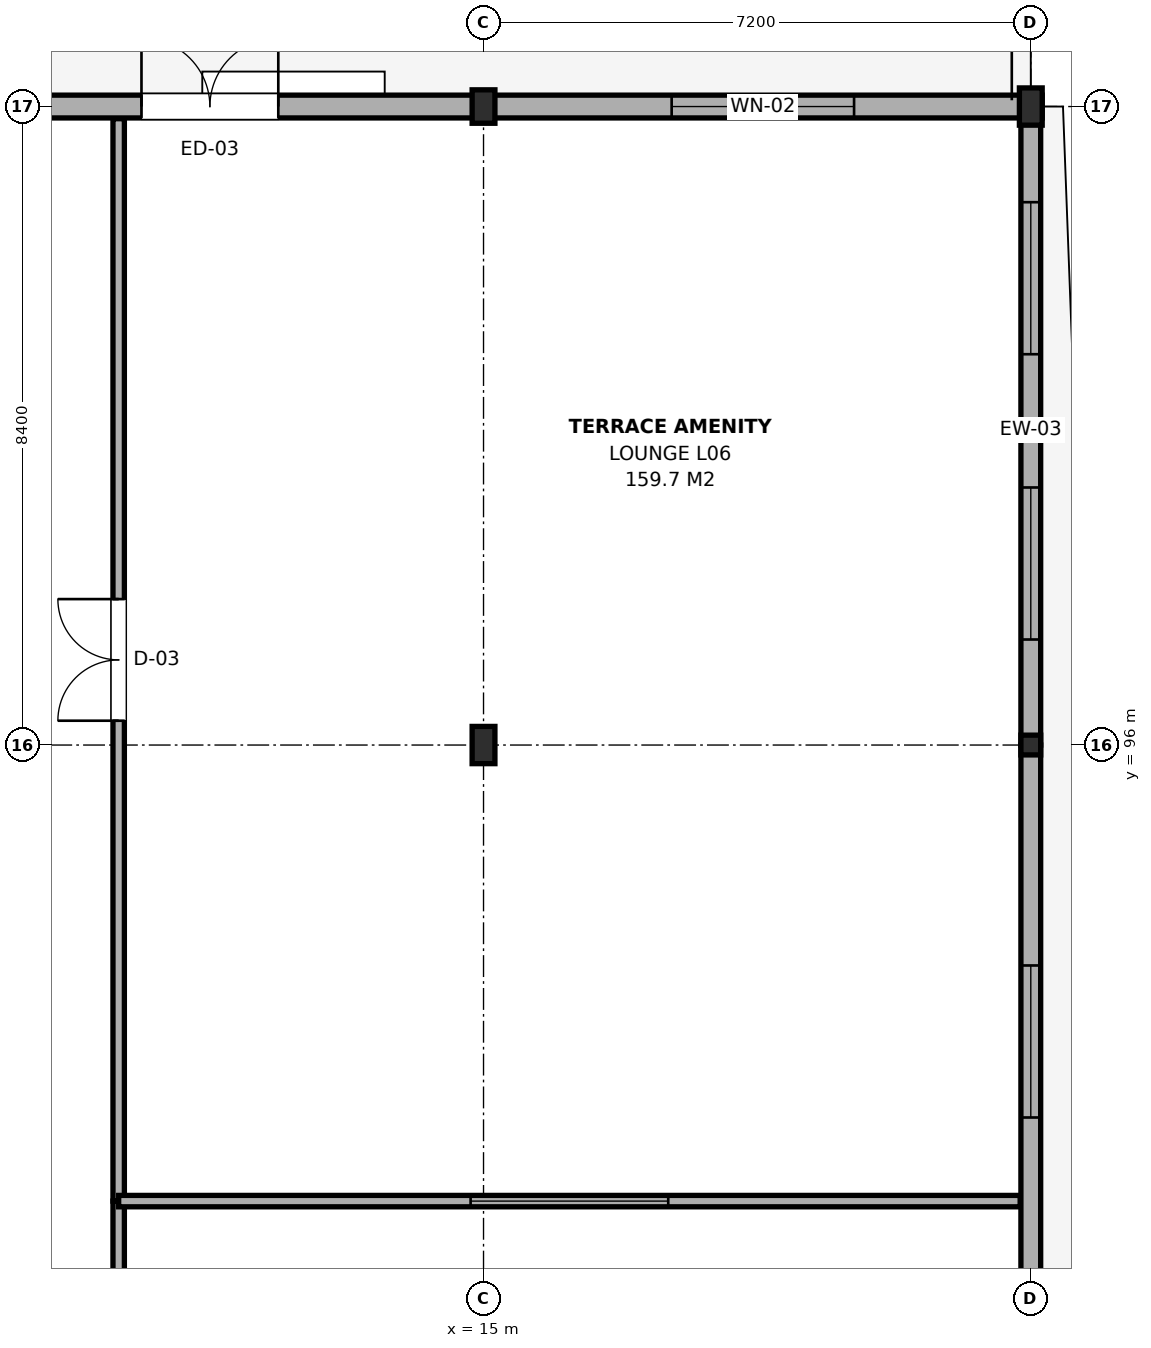
"""IFC4 building model, lengths in metres.
Left out: names, types, materials, properties, quantities, classifications, styles, units other than length and angle.
Written with IfcOpenShell. Run it as: python <this file> out.ifc"""

import sys

from ifc_helpers import new_model, si_unit, direction, frame, frame_2d, origin, origin_2d, place, context, subcontext, project, spatial, rectangle, i_section, extrude, element, fill, save


model = new_model("IFC4")
c1 = context("Model", 3, precision=1e-05, world=origin(), true_north=direction((0.0, 1.0)))
c2 = subcontext(c1, "Body", "Model", "MODEL_VIEW")
j1 = project(units=[si_unit("LENGTHUNIT", "METRE"), si_unit("PLANEANGLEUNIT", "RADIAN")], contexts=[c1])
p1 = place(None, origin())
s1 = spatial("IfcSite", under=j1, at=p1, CompositionType="ELEMENT")
p2 = place(p1, origin())
s2 = spatial("IfcBuilding", under=s1, at=p2, CompositionType="ELEMENT")
p3 = place(p2, frame((0.0, 0.0, 24.9)))
s3 = spatial("IfcBuildingStorey", under=s2, at=p3, CompositionType="ELEMENT", Elevation=24.9)
p4 = place(p3, frame((15.0, 96.0, 0.0), z_axis=(0.0, 0.0, 1.0), x_axis=(1.0, 0.0, 0.0)))
e1 = element("IfcColumn", 1, at=p4, inside=s3, PredefinedType="COLUMN", context=c2, shape_type="SweptSolid", body=[
    extrude(i_section(OverallWidth=0.3, OverallDepth=0.49, WebThickness=0.012, FlangeThickness=0.023, FilletRadius=0.027, at=origin_2d()), origin(), (0.0, 0.0, 1.0), 3.9),
])
p5 = place(p3, frame((15.0, 104.4, 0.0), z_axis=(0.0, 0.0, 1.0), x_axis=(1.0, 0.0, 0.0)))
e2 = element("IfcColumn", 2, at=p5, inside=s3, PredefinedType="COLUMN", context=c2, shape_type="SweptSolid", body=[
    extrude(i_section(OverallWidth=0.3, OverallDepth=0.44, WebThickness=0.011, FlangeThickness=0.021, FilletRadius=0.027, at=origin_2d()), origin(), (0.0, 0.0, 1.0), 3.9),
])
p6 = place(p3, frame((22.2, 96.0, 0.0), z_axis=(0.0, 0.0, 1.0), x_axis=(1.0, 0.0, 0.0)))
e3 = element("IfcColumn", 3, at=p6, inside=s3, PredefinedType="COLUMN", context=c2, shape_type="SweptSolid", body=[
    extrude(i_section(OverallWidth=0.26, OverallDepth=0.26, WebThickness=0.01, FlangeThickness=0.018, FilletRadius=0.024, at=origin_2d()), origin(), (0.0, 0.0, 1.0), 3.9),
])
p7 = place(p3, frame((22.2, 104.4, 0.0), z_axis=(0.0, 0.0, 1.0), x_axis=(1.0, 0.0, 0.0)))
e4 = element("IfcColumn", 4, at=p7, inside=s3, PredefinedType="COLUMN", context=c2, shape_type="SweptSolid", body=[
    extrude(i_section(OverallWidth=0.3, OverallDepth=0.49, WebThickness=0.012, FlangeThickness=0.023, FilletRadius=0.027, at=origin_2d()), origin(), (0.0, 0.0, 1.0), 3.9),
])
p8 = place(p3, frame((22.2, 88.2, 0.0), z_axis=(0.0, 0.0, 1.0), x_axis=(0.0, 1.0, 0.0)))
e5 = element("IfcWall", 5, at=p8, inside=s3, PredefinedType="SOLIDWALL", context=c2, shape_type="SweptSolid", body=[
    extrude(rectangle(XDim=7.8, YDim=0.26, at=frame_2d((3.9, 0.0))), origin(), (0.0, 0.0, 1.0), 3.165),
])
p9 = place(p8, frame((2.9, 0.0, 0.9)))
e6 = element("IfcOpeningElement", 6, at=p9, cuts=e5, PredefinedType="OPENING", context=c2, shape_type="SweptSolid", body=[
    extrude(rectangle(XDim=2.0, YDim=1.8, at=frame_2d((1.0, 0.9))), frame((0.0, 0.145, 0.0), z_axis=(0.0, -1.0, 0.0), x_axis=(1.0, 0.0, 0.0)), (0.0, 0.0, 1.0), 0.29),
])
p10 = place(p3, frame((22.2, 96.0, 0.0), z_axis=(0.0, 0.0, 1.0), x_axis=(0.0, 1.0, 0.0)))
e7 = element("IfcWall", 7, at=p10, inside=s3, PredefinedType="SOLIDWALL", context=c2, shape_type="SweptSolid", body=[
    extrude(rectangle(XDim=8.53, YDim=0.26, at=frame_2d((4.265, 0.0))), origin(), (0.0, 0.0, 1.0), 3.215),
])
p11 = place(p10, frame((1.388, 0.0, 0.9)))
e8 = element("IfcOpeningElement", 8, at=p11, cuts=e7, PredefinedType="OPENING", context=c2, shape_type="SweptSolid", body=[
    extrude(rectangle(XDim=2.0, YDim=1.8, at=frame_2d((1.0, 0.9))), frame((0.0, 0.145, 0.0), z_axis=(0.0, -1.0, 0.0), x_axis=(1.0, 0.0, 0.0)), (0.0, 0.0, 1.0), 0.29),
])
p12 = place(p10, frame((5.142, 0.0, 0.9)))
e9 = element("IfcOpeningElement", 9, at=p12, cuts=e7, PredefinedType="OPENING", context=c2, shape_type="SweptSolid", body=[
    extrude(rectangle(XDim=2.0, YDim=1.8, at=frame_2d((1.0, 0.9))), frame((0.0, 0.145, 0.0), z_axis=(0.0, -1.0, 0.0), x_axis=(1.0, 0.0, 0.0)), (0.0, 0.0, 1.0), 0.29),
])
p13 = place(p3, frame((7.8, 104.4, 0.0), z_axis=(0.0, 0.0, 1.0), x_axis=(1.0, 0.0, 0.0)))
e10 = element("IfcWall", 10, at=p13, inside=s3, PredefinedType="SOLIDWALL", context=c2, shape_type="SweptSolid", body=[
    extrude(rectangle(XDim=7.2, YDim=0.3, at=frame_2d((3.6, 0.0))), origin(), (0.0, 0.0, 1.0), 3.265),
])
p14 = place(p13, frame((2.7, 0.0, 0.0)))
e11 = element("IfcOpeningElement", 11, at=p14, cuts=e10, PredefinedType="OPENING", context=c2, shape_type="SweptSolid", body=[
    extrude(rectangle(XDim=1.8, YDim=2.2, at=frame_2d((0.9, 1.1))), frame((0.0, 0.165, 0.0), z_axis=(0.0, -1.0, 0.0), x_axis=(1.0, 0.0, 0.0)), (0.0, 0.0, 1.0), 0.33),
])
p15 = place(p3, frame((15.0, 104.4, 0.0), z_axis=(0.0, 0.0, 1.0), x_axis=(1.0, 0.0, 0.0)))
e12 = element("IfcWall", 12, at=p15, inside=s3, PredefinedType="SOLIDWALL", context=c2, shape_type="SweptSolid", body=[
    extrude(rectangle(XDim=7.35, YDim=0.3, at=frame_2d((3.675, 0.0))), origin(), (0.0, 0.0, 1.0), 3.365),
])
p16 = place(p15, frame((2.475, 0.0, 0.9)))
e13 = element("IfcOpeningElement", 13, at=p16, cuts=e12, PredefinedType="OPENING", context=c2, shape_type="SweptSolid", body=[
    extrude(rectangle(XDim=2.4, YDim=2.1, at=frame_2d((1.2, 1.05))), frame((0.0, 0.165, 0.0), z_axis=(0.0, -1.0, 0.0), x_axis=(1.0, 0.0, 0.0)), (0.0, 0.0, 1.0), 0.33),
])
p17 = place(p3, frame((10.2, 73.8, 0.0), z_axis=(0.0, 0.0, 1.0), x_axis=(0.0, 1.0, 0.0)))
e14 = element("IfcWall", 14, at=p17, inside=s3, PredefinedType="PARTITIONING", context=c2, shape_type="SweptSolid", body=[
    extrude(rectangle(XDim=16.2, YDim=0.15, at=frame_2d((8.1, 0.0))), origin(), (0.0, 0.0, 1.0), 3.165),
])
p18 = place(p17, frame((7.575, 0.0, 0.0)))
e15 = element("IfcOpeningElement", 15, at=p18, cuts=e14, PredefinedType="OPENING", context=c2, shape_type="SweptSolid", body=[
    extrude(rectangle(XDim=1.05, YDim=2.15, at=frame_2d((0.525, 1.075))), frame((0.0, 0.09, 0.0), z_axis=(0.0, -1.0, 0.0), x_axis=(1.0, 0.0, 0.0)), (0.0, 0.0, 1.0), 0.18),
])
p19 = place(p17, frame((2.75, 0.0, 0.95)))
e16 = element("IfcOpeningElement", 16, at=p19, cuts=e14, PredefinedType="OPENING", context=c2, shape_type="SweptSolid", body=[
    extrude(rectangle(XDim=2.6, YDim=1.5, at=frame_2d((1.3, 0.75))), frame((0.0, 0.09, 0.0), z_axis=(0.0, -1.0, 0.0), x_axis=(1.0, 0.0, 0.0)), (0.0, 0.0, 1.0), 0.18),
])
p20 = place(p17, frame((10.85, 0.0, 0.95)))
e17 = element("IfcOpeningElement", 17, at=p20, cuts=e14, PredefinedType="OPENING", context=c2, shape_type="SweptSolid", body=[
    extrude(rectangle(XDim=2.6, YDim=1.5, at=frame_2d((1.3, 0.75))), frame((0.0, 0.09, 0.0), z_axis=(0.0, -1.0, 0.0), x_axis=(1.0, 0.0, 0.0)), (0.0, 0.0, 1.0), 0.18),
])
p21 = place(p3, frame((10.2, 90.0, 0.0), z_axis=(0.0, 0.0, 1.0), x_axis=(0.0, 1.0, 0.0)))
e18 = element("IfcWall", 18, at=p21, inside=s3, PredefinedType="PARTITIONING", context=c2, shape_type="SweptSolid", body=[
    extrude(rectangle(XDim=14.24, YDim=0.15, at=frame_2d((7.12, 0.0))), origin(), (0.0, 0.0, 1.0), 3.165),
])
p22 = place(p21, frame((6.32, 0.0, 0.0)))
e19 = element("IfcOpeningElement", 19, at=p22, cuts=e18, PredefinedType="OPENING", context=c2, shape_type="SweptSolid", body=[
    extrude(rectangle(XDim=1.6, YDim=2.15, at=frame_2d((0.8, 1.075))), frame((0.0, 0.09, 0.0), z_axis=(0.0, -1.0, 0.0), x_axis=(1.0, 0.0, 0.0)), (0.0, 0.0, 1.0), 0.18),
])
p23 = place(p3, frame((10.2, 90.0, 0.0), z_axis=(0.0, 0.0, 1.0), x_axis=(1.0, 0.0, 0.0)))
e20 = element("IfcWall", 20, at=p23, inside=s3, PredefinedType="PARTITIONING", context=c2, shape_type="SweptSolid", body=[
    extrude(rectangle(XDim=11.86, YDim=0.15, at=frame_2d((5.93, 0.0))), origin(), (0.0, 0.0, 1.0), 3.165),
])
p24 = place(p23, frame((4.63, 0.0, 0.95)))
e21 = element("IfcOpeningElement", 21, at=p24, cuts=e20, PredefinedType="OPENING", context=c2, shape_type="SweptSolid", body=[
    extrude(rectangle(XDim=2.6, YDim=1.5, at=frame_2d((1.3, 0.75))), frame((0.0, 0.09, 0.0), z_axis=(0.0, -1.0, 0.0), x_axis=(1.0, 0.0, 0.0)), (0.0, 0.0, 1.0), 0.18),
])
p25 = place(p9, origin())
e22 = element("IfcWindow", 22, at=p25, inside=s3, PartitioningType="SINGLE_PANEL", PredefinedType="WINDOW", context=c2, shape_type="SweptSolid", body=[
    extrude(rectangle(XDim=2.0, YDim=1.8, at=frame_2d((1.0, 0.9))), frame((0.0, 0.03, 0.0), z_axis=(0.0, -1.0, 0.0), x_axis=(1.0, 0.0, 0.0)), (0.0, 0.0, 1.0), 0.06),
])
fill(e6, e22)
p26 = place(p11, origin())
e23 = element("IfcWindow", 23, at=p26, inside=s3, PartitioningType="SINGLE_PANEL", PredefinedType="WINDOW", context=c2, shape_type="SweptSolid", body=[
    extrude(rectangle(XDim=2.0, YDim=1.8, at=frame_2d((1.0, 0.9))), frame((0.0, 0.03, 0.0), z_axis=(0.0, -1.0, 0.0), x_axis=(1.0, 0.0, 0.0)), (0.0, 0.0, 1.0), 0.06),
])
fill(e8, e23)
p27 = place(p12, origin())
e24 = element("IfcWindow", 24, at=p27, inside=s3, PartitioningType="SINGLE_PANEL", PredefinedType="WINDOW", context=c2, shape_type="SweptSolid", body=[
    extrude(rectangle(XDim=2.0, YDim=1.8, at=frame_2d((1.0, 0.9))), frame((0.0, 0.03, 0.0), z_axis=(0.0, -1.0, 0.0), x_axis=(1.0, 0.0, 0.0)), (0.0, 0.0, 1.0), 0.06),
])
fill(e9, e24)
p28 = place(p14, origin())
e25 = element("IfcDoor", 25, at=p28, inside=s3, OperationType="DOUBLE_DOOR_SINGLE_SWING", PredefinedType="DOOR", context=c2, shape_type="SweptSolid", body=[
    extrude(rectangle(XDim=1.8, YDim=2.2, at=frame_2d((0.9, 1.1))), frame((0.0, 0.025, 0.0), z_axis=(0.0, -1.0, 0.0), x_axis=(1.0, 0.0, 0.0)), (0.0, 0.0, 1.0), 0.05),
])
fill(e11, e25)
p29 = place(p16, origin())
e26 = element("IfcWindow", 26, at=p29, inside=s3, PartitioningType="SINGLE_PANEL", PredefinedType="WINDOW", context=c2, shape_type="SweptSolid", body=[
    extrude(rectangle(XDim=2.4, YDim=2.1, at=frame_2d((1.2, 1.05))), frame((0.0, 0.03, 0.0), z_axis=(0.0, -1.0, 0.0), x_axis=(1.0, 0.0, 0.0)), (0.0, 0.0, 1.0), 0.06),
])
fill(e13, e26)
p30 = place(p22, origin())
e27 = element("IfcDoor", 27, at=p30, inside=s3, OperationType="DOUBLE_DOOR_SINGLE_SWING", PredefinedType="DOOR", context=c2, shape_type="SweptSolid", body=[
    extrude(rectangle(XDim=1.6, YDim=2.15, at=frame_2d((0.8, 1.075))), frame((0.0, 0.025, 0.0), z_axis=(0.0, -1.0, 0.0), x_axis=(1.0, 0.0, 0.0)), (0.0, 0.0, 1.0), 0.05),
])
fill(e19, e27)
p31 = place(p24, origin())
e28 = element("IfcWindow", 28, at=p31, inside=s3, PartitioningType="SINGLE_PANEL", PredefinedType="WINDOW", context=c2, shape_type="SweptSolid", body=[
    extrude(rectangle(XDim=2.6, YDim=1.5, at=frame_2d((1.3, 0.75))), frame((0.0, 0.03, 0.0), z_axis=(0.0, -1.0, 0.0), x_axis=(1.0, 0.0, 0.0)), (0.0, 0.0, 1.0), 0.06),
])
fill(e21, e28)
save(model, sys.argv[1])
